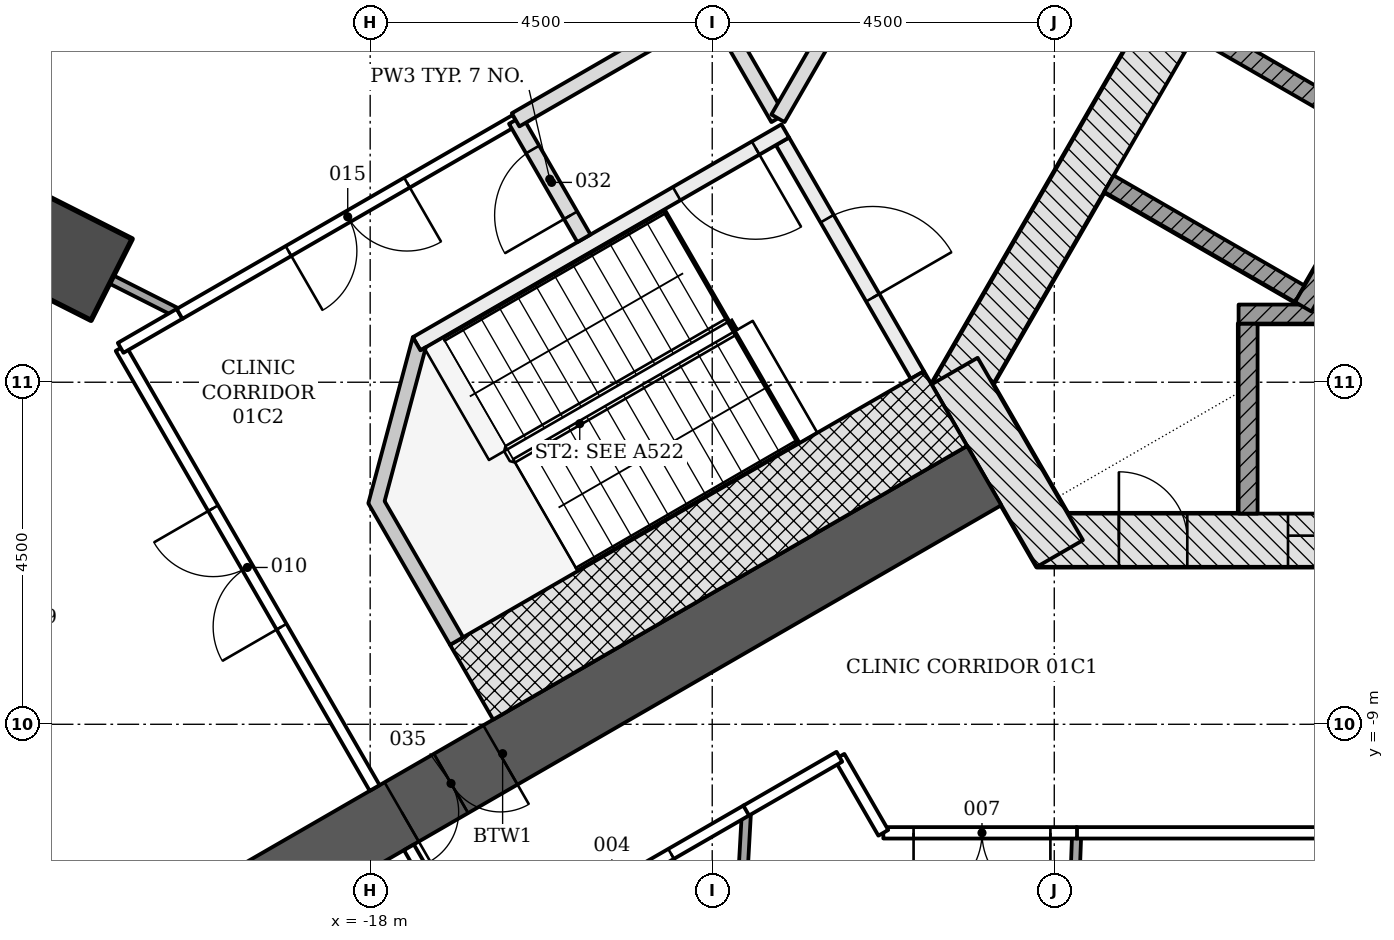
"""IFC4 building model, lengths in metres.
Left out: names, types, materials, properties, quantities, classifications, styles, units other than length and angle.
Written with IfcOpenShell. Run it as: python <this file> out.ifc"""

import sys

from ifc_helpers import new_model, si_unit, direction, frame, frame_2d, origin, origin_2d, place, context, subcontext, project, spatial, polyline, rectangle, outline, extrude, element, fill, save


model = new_model("IFC4")
c1 = context("Model", 3, precision=1e-05, world=origin(), true_north=direction((0.0, 1.0)))
c2 = subcontext(c1, "Body", "Model", "MODEL_VIEW")
j1 = project(units=[si_unit("LENGTHUNIT", "METRE"), si_unit("PLANEANGLEUNIT", "RADIAN")], contexts=[c1])
p1 = place(None, origin())
s1 = spatial("IfcSite", under=j1, at=p1, CompositionType="ELEMENT")
p2 = place(p1, origin())
s2 = spatial("IfcBuilding", under=s1, at=p2, CompositionType="ELEMENT")
p3 = place(p2, frame((0.0, 0.0, 6.0)))
s3 = spatial("IfcBuildingStorey", under=s2, at=p3, CompositionType="ELEMENT", Elevation=6.0)
p4 = place(p3, frame((-21.937, -2.88, -0.25), z_axis=(0.0, 0.0, 1.0), x_axis=(-0.89250065469, 0.451046096733, 0.0)))
e1 = element("IfcColumn", 1, at=p4, inside=s3, PredefinedType="COLUMN", context=c2, shape_type="SweptSolid", body=[
    extrude(rectangle(XDim=1.2, YDim=1.2, at=origin_2d()), origin(), (0.0, 0.0, 1.0), 4.5),
])
p5 = place(p3, frame((-9.229, -6.578, -0.25), z_axis=(0.0, 0.0, 1.0), x_axis=(1.0, 0.0, 0.0)))
e2 = element("IfcWall", 2, at=p5, inside=s3, PredefinedType="SHEAR", context=c2, shape_type="SweptSolid", body=[
    extrude(rectangle(XDim=18.458, YDim=0.7, at=frame_2d((9.229, 0.0))), origin(), (0.0, 0.0, 1.0), 4.5),
])
p6 = place(p5, frame((3.304, 0.0, 0.25)))
e3 = element("IfcOpeningElement", 3, at=p6, cuts=e2, PredefinedType="OPENING", context=c2, shape_type="SweptSolid", body=[
    extrude(rectangle(XDim=1.1, YDim=2.1, at=frame_2d((0.55, 1.05))), frame((0.0, 0.36, 0.0), z_axis=(0.0, -1.0, 0.0), x_axis=(1.0, 0.0, 0.0)), (0.0, 0.0, 1.0), 0.72),
])
p7 = place(p5, frame((5.454, 0.0, 0.25)))
e4 = element("IfcOpeningElement", 4, at=p7, cuts=e2, PredefinedType="OPENING", context=c2, shape_type="SweptSolid", body=[
    extrude(rectangle(XDim=1.1, YDim=2.1, at=frame_2d((0.55, 1.05))), frame((0.0, 0.36, 0.0), z_axis=(0.0, -1.0, 0.0), x_axis=(1.0, 0.0, 0.0)), (0.0, 0.0, 1.0), 0.72),
])
p8 = place(p5, frame((7.604, 0.0, 0.25)))
e5 = element("IfcOpeningElement", 5, at=p8, cuts=e2, PredefinedType="OPENING", context=c2, shape_type="SweptSolid", body=[
    extrude(rectangle(XDim=1.1, YDim=2.1, at=frame_2d((0.55, 1.05))), frame((0.0, 0.36, 0.0), z_axis=(0.0, -1.0, 0.0), x_axis=(1.0, 0.0, 0.0)), (0.0, 0.0, 1.0), 0.72),
])
p9 = place(p5, frame((9.754, 0.0, 0.25)))
e6 = element("IfcOpeningElement", 6, at=p9, cuts=e2, PredefinedType="OPENING", context=c2, shape_type="SweptSolid", body=[
    extrude(rectangle(XDim=1.1, YDim=2.1, at=frame_2d((0.55, 1.05))), frame((0.0, 0.36, 0.0), z_axis=(0.0, -1.0, 0.0), x_axis=(1.0, 0.0, 0.0)), (0.0, 0.0, 1.0), 0.72),
])
p10 = place(p5, frame((11.904, 0.0, 0.25)))
e7 = element("IfcOpeningElement", 7, at=p10, cuts=e2, PredefinedType="OPENING", context=c2, shape_type="SweptSolid", body=[
    extrude(rectangle(XDim=1.1, YDim=2.1, at=frame_2d((0.55, 1.05))), frame((0.0, 0.36, 0.0), z_axis=(0.0, -1.0, 0.0), x_axis=(1.0, 0.0, 0.0)), (0.0, 0.0, 1.0), 0.72),
])
p11 = place(p5, frame((14.054, 0.0, 0.25)))
e8 = element("IfcOpeningElement", 8, at=p11, cuts=e2, PredefinedType="OPENING", context=c2, shape_type="SweptSolid", body=[
    extrude(rectangle(XDim=1.1, YDim=2.1, at=frame_2d((0.55, 1.05))), frame((0.0, 0.36, 0.0), z_axis=(0.0, -1.0, 0.0), x_axis=(1.0, 0.0, 0.0)), (0.0, 0.0, 1.0), 0.72),
])
p12 = place(p5, frame((1.079, 0.0, 0.25)))
e9 = element("IfcOpeningElement", 9, at=p12, cuts=e2, PredefinedType="OPENING", context=c2, shape_type="SweptSolid", body=[
    extrude(rectangle(XDim=0.9, YDim=2.1, at=frame_2d((0.45, 1.05))), frame((0.0, 0.36, 0.0), z_axis=(0.0, -1.0, 0.0), x_axis=(1.0, 0.0, 0.0)), (0.0, 0.0, 1.0), 0.72),
])
p13 = place(p3, frame((-1.083, 11.281, -0.25), z_axis=(0.0, 0.0, 1.0), x_axis=(-0.500001446645, -0.866024568562, 0.0)))
e10 = element("IfcWall", 10, at=p13, inside=s3, PredefinedType="SHEAR", context=c2, shape_type="SweptSolid", body=[
    extrude(rectangle(XDim=18.458, YDim=0.7, at=frame_2d((9.229, 0.0))), origin(), (0.0, 0.0, 1.0), 4.5),
])
p14 = place(p13, frame((8.979, 0.0, 0.25)))
e11 = element("IfcOpeningElement", 11, at=p14, cuts=e10, PredefinedType="OPENING", context=c2, shape_type="SweptSolid", body=[
    extrude(rectangle(XDim=1.2, YDim=2.1, at=frame_2d((0.6, 1.05))), frame((0.0, 0.36, 0.0), z_axis=(0.0, -1.0, 0.0), x_axis=(1.0, 0.0, 0.0)), (0.0, 0.0, 1.0), 0.72),
])
p15 = place(p13, frame((11.029, 0.0, 0.25)))
e12 = element("IfcOpeningElement", 12, at=p15, cuts=e10, PredefinedType="OPENING", context=c2, shape_type="SweptSolid", body=[
    extrude(rectangle(XDim=1.2, YDim=2.1, at=frame_2d((0.6, 1.05))), frame((0.0, 0.36, 0.0), z_axis=(0.0, -1.0, 0.0), x_axis=(1.0, 0.0, 0.0)), (0.0, 0.0, 1.0), 0.72),
])
p16 = place(p3, frame((-10.311, -4.353, -0.25), z_axis=(0.0, 0.0, 1.0), x_axis=(0.500042739161, -0.866000726912, 0.0)))
e13 = element("IfcWall", 13, at=p16, inside=s3, PredefinedType="SHEAR", context=c2, shape_type="SweptSolid", body=[
    extrude(rectangle(XDim=2.771, YDim=0.7, at=frame_2d((1.386, 0.0))), origin(), (0.0, 0.0, 1.0), 4.5),
])
p17 = place(p3, frame((-9.922, -5.728, -0.25), z_axis=(0.0, 0.0, 1.0), x_axis=(-0.866028046028, -0.499995423472, 0.0)))
e14 = element("IfcWall", 14, at=p17, inside=s3, PredefinedType="SHEAR", context=c2, shape_type="SweptSolid", body=[
    extrude(rectangle(XDim=14.633, YDim=0.9, at=frame_2d((7.316, 0.0))), origin(), (0.0, 0.0, 1.0), 4.5),
])
p18 = place(p17, frame((7.35, 0.0, 0.25)))
e15 = element("IfcOpeningElement", 15, at=p18, cuts=e14, PredefinedType="OPENING", context=c2, shape_type="SweptSolid", body=[
    extrude(rectangle(XDim=1.5, YDim=2.1, at=frame_2d((0.75, 1.05))), frame((0.0, 0.46, 0.0), z_axis=(0.0, -1.0, 0.0), x_axis=(1.0, 0.0, 0.0)), (0.0, 0.0, 1.0), 0.92),
])
p19 = place(p3, frame((-6.45, -6.228, -0.25), z_axis=(0.0, 0.0, 1.0), x_axis=(0.0, 1.0, 0.0)))
e16 = element("IfcWall", 16, at=p19, inside=s3, PredefinedType="PARTITIONING", context=c2, shape_type="SweptSolid", body=[
    extrude(rectangle(XDim=2.5, YDim=0.25, at=frame_2d((1.25, 0.0))), origin(), (0.0, 0.0, 1.0), 4.5),
])
p20 = place(p3, frame((-6.575, -3.603, 0.0), z_axis=(0.0, 0.0, 1.0), x_axis=(1.0, 0.0, 0.0)))
e17 = element("IfcWall", 17, at=p20, inside=s3, PredefinedType="PARTITIONING", context=c2, shape_type="SweptSolid", body=[
    extrude(rectangle(XDim=13.15, YDim=0.25, at=frame_2d((6.575, 0.0))), origin(), (0.0, 0.0, 1.0), 4.25),
])
for number, where, z_axis, x_axis in (
    (18, (-7.106, 0.148, -0.25), (0.0, 0.0, 1.0), (0.866, -0.5, 0.0)),
    (19, (-8.281, -1.887, -0.25), (0.0, 0.0, 1.0), (0.866, -0.5, 0.0)),
):
    element("IfcWall", number, at=place(p3, frame(where, z_axis=z_axis, x_axis=x_axis)), inside=s3, PredefinedType="PARTITIONING", context=c2, shape_type="SweptSolid", body=[
        extrude(rectangle(XDim=2.9, YDim=0.25, at=frame_2d((1.45, 0.0))), origin(), (0.0, 0.0, 1.0), 4.5),
    ])
p21 = place(p3, frame((0.176, 6.711, 0.0), z_axis=(0.0, 0.0, 1.0), x_axis=(-0.500004227369, -0.866022963098, 0.0)))
e20 = element("IfcWall", 20, at=p21, inside=s3, PredefinedType="PARTITIONING", context=c2, shape_type="SweptSolid", body=[
    extrude(rectangle(XDim=11.8, YDim=0.25, at=frame_2d((5.9, 0.0))), origin(), (0.0, 0.0, 1.0), 4.25),
])
p22 = place(p3, frame((-12.576, -1.331, -0.25), z_axis=(0.0, 0.0, 1.0), x_axis=(0.499970499736, -0.8660424351, 0.0)))
e21 = element("IfcWall", 21, at=p22, inside=s3, PredefinedType="SHEAR", context=c2, shape_type="SweptSolid", body=[
    extrude(rectangle(XDim=3.55, YDim=0.2, at=frame_2d((1.775, 0.0))), origin(), (0.0, 0.0, 1.0), 4.5),
])
p23 = place(p22, frame((1.175, 0.0, 0.25)))
e22 = element("IfcOpeningElement", 22, at=p23, cuts=e21, PredefinedType="OPENING", context=c2, shape_type="SweptSolid", body=[
    extrude(rectangle(XDim=1.2, YDim=2.1, at=frame_2d((0.6, 1.05))), frame((0.0, 0.11, 0.0), z_axis=(0.0, -1.0, 0.0), x_axis=(1.0, 0.0, 0.0)), (0.0, 0.0, 1.0), 0.22),
])
p24 = place(p3, frame((-12.539, -1.194, -0.25), z_axis=(0.0, 0.0, 1.0), x_axis=(-0.866045472092, -0.499965239061, 0.0)))
e23 = element("IfcWall", 23, at=p24, inside=s3, PredefinedType="SHEAR", context=c2, shape_type="SweptSolid", body=[
    extrude(rectangle(XDim=5.6, YDim=0.2, at=frame_2d((2.8, 0.0))), origin(), (0.0, 0.0, 1.0), 4.5),
])
p25 = place(p24, frame((0.45, 0.0, 0.25)))
e24 = element("IfcOpeningElement", 24, at=p25, cuts=e23, PredefinedType="OPENING", context=c2, shape_type="SweptSolid", body=[
    extrude(rectangle(XDim=1.2, YDim=2.1, at=frame_2d((0.6, 1.05))), frame((0.0, 0.11, 0.0), z_axis=(0.0, -1.0, 0.0), x_axis=(1.0, 0.0, 0.0)), (0.0, 0.0, 1.0), 0.22),
])
p26 = place(p3, frame((-10.43, -4.847, -0.25), z_axis=(0.0, 0.0, 1.0), x_axis=(-0.866018442252, -0.500012057535, 0.0)))
e25 = element("IfcWall", 25, at=p26, inside=s3, PredefinedType="SHEAR", context=c2, shape_type="SweptSolid", body=[
    extrude(rectangle(XDim=7.2, YDim=1.136, at=frame_2d((3.6, 0.0))), origin(), (0.0, 0.0, 1.0), 4.5),
])
p27 = place(p3, frame((0.0, 0.0, -0.25)))
e26 = element("IfcWall", 26, at=p27, inside=s3, PredefinedType="SHEAR", context=c2, shape_type="SweptSolid", body=[
    extrude(outline(polyline([(-17.439, -3.907), (-18.025, -6.093), (-16.95, -7.955), (-16.777, -7.855), (-17.81, -6.065), (-17.267, -4.039), (-17.339, -4.081), (-17.339, -4.081), (-17.339, -4.081), (-17.339, -4.081), (-17.339, -4.081), (-17.339, -4.081), (-17.339, -4.081), (-17.339, -4.081), (-17.339, -4.081), (-17.339, -4.081), (-17.339, -4.081), (-17.339, -4.081), (-17.339, -4.081), (-17.339, -4.081), (-17.339, -4.081), (-17.339, -4.081), (-17.339, -4.081), (-17.439, -3.907)])), origin(), (0.0, 0.0, 1.0), 4.5),
])
p28 = place(p3, frame((-13.429, -16.96, 0.0), z_axis=(0.0, 0.0, 1.0), x_axis=(0.055551088657, 0.998455846069, 0.0)))
e27 = element("IfcWall", 27, at=p28, inside=s3, PredefinedType="PARTITIONING", context=c2, shape_type="SweptSolid", body=[
    extrude(rectangle(XDim=6.838, YDim=0.12, at=frame_2d((3.419, 0.0))), origin(), (0.0, 0.0, 1.0), 3.638),
])
p29 = place(p3, frame((-13.045, -10.13, 0.0), z_axis=(0.0, 0.0, 1.0), x_axis=(-0.866035577775, -0.499982377718, 0.0)))
e28 = element("IfcWall", 28, at=p29, inside=s3, PredefinedType="PARTITIONING", context=c2, shape_type="SweptSolid", body=[
    extrude(rectangle(XDim=4.093, YDim=0.15, at=frame_2d((2.046, 0.0))), origin(), (0.0, 0.0, 1.0), 3.638),
])
p30 = place(p29, frame((1.15, 0.0, 0.0)))
e29 = element("IfcOpeningElement", 29, at=p30, cuts=e28, PredefinedType="OPENING", context=c2, shape_type="SweptSolid", body=[
    extrude(rectangle(XDim=1.8, YDim=2.1, at=frame_2d((0.9, 1.05))), frame((0.0, 0.085, 0.0), z_axis=(0.0, -1.0, 0.0), x_axis=(1.0, 0.0, 0.0)), (0.0, 0.0, 1.0), 0.17),
])
p31 = place(p3, frame((-16.591, -12.176, 0.0), z_axis=(0.0, 0.0, 1.0), x_axis=(-0.499965372359, 0.866045395139, 0.0)))
e30 = element("IfcWall", 30, at=p31, inside=s3, PredefinedType="PARTITIONING", context=c2, shape_type="SweptSolid", body=[
    extrude(rectangle(XDim=1.798, YDim=0.15, at=frame_2d((0.899, 0.0))), origin(), (0.0, 0.0, 1.0), 3.638),
])
p32 = place(p3, frame((-8.705, -10.429, 0.0), z_axis=(0.0, 0.0, 1.0), x_axis=(-0.037170289837, -0.999308945999, 0.0)))
e31 = element("IfcWall", 31, at=p32, inside=s3, PredefinedType="PARTITIONING", context=c2, shape_type="SweptSolid", body=[
    extrude(rectangle(XDim=7.343, YDim=0.12, at=frame_2d((3.672, 0.0))), origin(), (0.0, 0.0, 1.0), 3.638),
])
p33 = place(p3, frame((0.004, -10.428, 0.0), z_axis=(0.0, 0.0, 1.0), x_axis=(-1.0, 0.0, 0.0)))
e32 = element("IfcWall", 32, at=p33, inside=s3, PredefinedType="PARTITIONING", context=c2, shape_type="SweptSolid", body=[
    extrude(rectangle(XDim=8.713, YDim=0.15, at=frame_2d((4.356, 0.0))), origin(), (0.0, 0.0, 1.0), 3.638),
])
p34 = place(p33, frame((3.45, 0.0, 0.0)))
e33 = element("IfcOpeningElement", 33, at=p34, cuts=e32, PredefinedType="OPENING", context=c2, shape_type="SweptSolid", body=[
    extrude(rectangle(XDim=1.8, YDim=2.1, at=frame_2d((0.9, 1.05))), frame((0.0, 0.085, 0.0), z_axis=(0.0, -1.0, 0.0), x_axis=(1.0, 0.0, 0.0)), (0.0, 0.0, 1.0), 0.17),
])
p35 = place(p3, frame((-8.701, -10.428, 0.0), z_axis=(0.0, 0.0, 1.0), x_axis=(-1.0, 0.0, 0.0)))
e34 = element("IfcWall", 34, at=p35, inside=s3, PredefinedType="PARTITIONING", context=c2, shape_type="SweptSolid", body=[
    extrude(rectangle(XDim=2.548, YDim=0.15, at=frame_2d((1.274, 0.0))), origin(), (0.0, 0.0, 1.0), 3.638),
])
p36 = place(p35, frame((0.35, 0.0, 0.0)))
e35 = element("IfcOpeningElement", 35, at=p36, cuts=e34, PredefinedType="OPENING", context=c2, shape_type="SweptSolid", body=[
    extrude(rectangle(XDim=1.8, YDim=2.1, at=frame_2d((0.9, 1.05))), frame((0.0, 0.085, 0.0), z_axis=(0.0, -1.0, 0.0), x_axis=(1.0, 0.0, 0.0)), (0.0, 0.0, 1.0), 0.17),
])
p37 = place(p3, frame((-11.249, -10.428, 0.0), z_axis=(0.0, 0.0, 1.0), x_axis=(-0.499978438088, 0.866037852202, 0.0)))
e36 = element("IfcWall", 36, at=p37, inside=s3, PredefinedType="PARTITIONING", context=c2, shape_type="SweptSolid", body=[
    extrude(rectangle(XDim=1.156, YDim=0.15, at=frame_2d((0.578, 0.0))), origin(), (0.0, 0.0, 1.0), 4.25),
])
p38 = place(p3, frame((-11.827, -9.427, 0.0), z_axis=(0.0, 0.0, 1.0), x_axis=(-0.865984561414, -0.500070734389, 0.0)))
e37 = element("IfcWall", 37, at=p38, inside=s3, PredefinedType="PARTITIONING", context=c2, shape_type="SweptSolid", body=[
    extrude(rectangle(XDim=1.416, YDim=0.15, at=frame_2d((0.708, 0.0))), origin(), (0.0, 0.0, 1.0), 3.638),
])
p39 = place(p3, frame((-17.941, -9.838, 0.0), z_axis=(0.0, 0.0, 1.0), x_axis=(-0.500048140185, 0.865997608252, 0.0)))
e38 = element("IfcWall", 38, at=p39, inside=s3, PredefinedType="PARTITIONING", context=c2, shape_type="SweptSolid", body=[
    extrude(rectangle(XDim=6.683, YDim=0.15, at=frame_2d((3.342, 0.0))), origin(), (0.0, 0.0, 1.0), 3.638),
])
p40 = place(p39, frame((2.45, 0.0, 0.0)))
e39 = element("IfcOpeningElement", 39, at=p40, cuts=e38, PredefinedType="OPENING", context=c2, shape_type="SweptSolid", body=[
    extrude(rectangle(XDim=1.8, YDim=2.1, at=frame_2d((0.9, 1.05))), frame((0.0, 0.085, 0.0), z_axis=(0.0, -1.0, 0.0), x_axis=(1.0, 0.0, 0.0)), (0.0, 0.0, 1.0), 0.17),
])
p41 = place(p3, frame((-21.283, -4.048, 0.0), z_axis=(0.0, 0.0, 1.0), x_axis=(0.865804825377, 0.500381858538, 0.0)))
e40 = element("IfcWall", 40, at=p41, inside=s3, PredefinedType="PARTITIONING", context=c2, shape_type="SweptSolid", body=[
    extrude(rectangle(XDim=0.897, YDim=0.15, at=frame_2d((0.449, 0.0))), origin(), (0.0, 0.0, 1.0), 3.638),
])
p42 = place(p3, frame((-20.509, -3.601, 0.0), z_axis=(0.0, 0.0, 1.0), x_axis=(-0.892316605155, 0.451410097544, 0.0)))
e41 = element("IfcWall", 41, at=p42, inside=s3, PredefinedType="PARTITIONING", context=c2, shape_type="SweptSolid", body=[
    extrude(rectangle(XDim=1.0, YDim=0.12, at=frame_2d((0.5, 0.0))), origin(), (0.0, 0.0, 1.0), 3.638),
])
p43 = place(p3, frame((-16.087, -1.049, 0.0), z_axis=(0.0, 0.0, 1.0), x_axis=(-0.866071706002, -0.49991979363, 0.0)))
e42 = element("IfcWall", 42, at=p43, inside=s3, PredefinedType="PARTITIONING", context=c2, shape_type="SweptSolid", body=[
    extrude(rectangle(XDim=5.105, YDim=0.15, at=frame_2d((2.552, 0.0))), origin(), (0.0, 0.0, 1.0), 3.638),
])
p44 = place(p43, frame((1.65, 0.0, 0.0)))
e43 = element("IfcOpeningElement", 43, at=p44, cuts=e42, PredefinedType="OPENING", context=c2, shape_type="SweptSolid", body=[
    extrude(rectangle(XDim=1.8, YDim=2.1, at=frame_2d((0.9, 1.05))), frame((0.0, 0.085, 0.0), z_axis=(0.0, -1.0, 0.0), x_axis=(1.0, 0.0, 0.0)), (0.0, 0.0, 1.0), 0.17),
])
p45 = place(p3, frame((-15.188, -2.607, 0.0), z_axis=(0.0, 0.0, 1.0), x_axis=(-0.500024172624, 0.866011447264, 0.0)))
e44 = element("IfcWall", 44, at=p45, inside=s3, PredefinedType="PARTITIONING", context=c2, shape_type="SweptSolid", body=[
    extrude(rectangle(XDim=1.798, YDim=0.2, at=frame_2d((0.899, 0.0))), origin(), (0.0, 0.0, 1.0), 3.638),
])
p46 = place(p45, frame((0.35, 0.0, 0.0)))
e45 = element("IfcOpeningElement", 45, at=p46, cuts=e44, PredefinedType="OPENING", context=c2, shape_type="SweptSolid", body=[
    extrude(rectangle(XDim=1.0, YDim=2.1, at=frame_2d((0.5, 1.05))), frame((0.0, 0.11, 0.0), z_axis=(0.0, -1.0, 0.0), x_axis=(1.0, 0.0, 0.0)), (0.0, 0.0, 1.0), 0.22),
])
p47 = place(p3, frame((-16.087, -1.048, 0.0), z_axis=(0.0, 0.0, 1.0), x_axis=(0.865988915629, 0.500063194015, 0.0)))
e46 = element("IfcWall", 46, at=p47, inside=s3, PredefinedType="PARTITIONING", context=c2, shape_type="SweptSolid", body=[
    extrude(rectangle(XDim=2.998, YDim=0.2, at=frame_2d((1.499, 0.0))), origin(), (0.0, 0.0, 1.0), 3.638),
])
p48 = place(p3, frame((-13.489, 0.451, 0.0), z_axis=(0.0, 0.0, 1.0), x_axis=(0.500044178772, -0.865999895656, 0.0)))
e47 = element("IfcWall", 47, at=p48, inside=s3, PredefinedType="PARTITIONING", context=c2, shape_type="SweptSolid", body=[
    extrude(rectangle(XDim=1.708, YDim=0.2, at=frame_2d((0.854, 0.0))), origin(), (0.0, 0.0, 1.0), 4.25),
])
p49 = place(p3, frame((-12.635, -1.028, 0.0), z_axis=(0.0, 0.0, 1.0), x_axis=(0.50005725472, 0.865992345233, 0.0)))
e48 = element("IfcWall", 48, at=p49, inside=s3, PredefinedType="PARTITIONING", context=c2, shape_type="SweptSolid", body=[
    extrude(rectangle(XDim=2.862, YDim=0.2, at=frame_2d((1.431, 0.0))), origin(), (0.0, 0.0, 1.0), 3.638),
])
p50 = place(p6, origin())
e49 = element("IfcDoor", 49, at=p50, inside=s3, OperationType="DOUBLE_DOOR_SLIDING", PredefinedType="DOOR", context=c2, shape_type="SweptSolid", body=[
    extrude(rectangle(XDim=1.1, YDim=2.1, at=frame_2d((0.55, 1.05))), frame((0.0, 0.025, 0.0), z_axis=(0.0, -1.0, 0.0), x_axis=(1.0, 0.0, 0.0)), (0.0, 0.0, 1.0), 0.05),
])
fill(e3, e49)
p51 = place(p12, origin())
e50 = element("IfcDoor", 50, at=p51, inside=s3, OperationType="SINGLE_SWING_LEFT", PredefinedType="DOOR", context=c2, shape_type="SweptSolid", body=[
    extrude(rectangle(XDim=0.9, YDim=2.1, at=frame_2d((0.45, 1.05))), frame((0.0, 0.075, 0.0), z_axis=(0.0, -1.0, 0.0), x_axis=(1.0, 0.0, 0.0)), (0.0, 0.0, 1.0), 0.15),
])
fill(e9, e50)
p52 = place(p23, origin())
e51 = element("IfcDoor", 51, at=p52, inside=s3, OperationType="SINGLE_SWING_RIGHT", PredefinedType="DOOR", context=c2, shape_type="SweptSolid", body=[
    extrude(rectangle(XDim=1.2, YDim=2.1, at=frame_2d((0.6, 1.05))), frame((0.0, 0.025, 0.0), z_axis=(0.0, -1.0, 0.0), x_axis=(1.0, 0.0, 0.0)), (0.0, 0.0, 1.0), 0.05),
])
fill(e22, e51)
p53 = place(p25, origin())
e52 = element("IfcDoor", 52, at=p53, inside=s3, OperationType="SINGLE_SWING_LEFT", PredefinedType="DOOR", context=c2, shape_type="SweptSolid", body=[
    extrude(rectangle(XDim=1.2, YDim=2.1, at=frame_2d((0.6, 1.05))), frame((0.0, 0.025, 0.0), z_axis=(0.0, -1.0, 0.0), x_axis=(1.0, 0.0, 0.0)), (0.0, 0.0, 1.0), 0.05),
])
fill(e24, e52)
p54 = place(p30, origin())
e53 = element("IfcDoor", 53, at=p54, inside=s3, OperationType="DOUBLE_DOOR_SINGLE_SWING", PredefinedType="DOOR", context=c2, shape_type="SweptSolid", body=[
    extrude(rectangle(XDim=1.8, YDim=2.1, at=frame_2d((0.9, 1.05))), frame((0.0, 0.025, 0.0), z_axis=(0.0, -1.0, 0.0), x_axis=(1.0, 0.0, 0.0)), (0.0, 0.0, 1.0), 0.05),
])
fill(e29, e53)
p55 = place(p36, origin())
e54 = element("IfcDoor", 54, at=p55, inside=s3, OperationType="DOUBLE_DOOR_SINGLE_SWING", PredefinedType="DOOR", context=c2, shape_type="SweptSolid", body=[
    extrude(rectangle(XDim=1.8, YDim=2.1, at=frame_2d((0.9, 1.05))), frame((0.0, 0.025, 0.0), z_axis=(0.0, -1.0, 0.0), x_axis=(1.0, 0.0, 0.0)), (0.0, 0.0, 1.0), 0.05),
])
fill(e35, e54)
p56 = place(p40, origin())
e55 = element("IfcDoor", 55, at=p56, inside=s3, OperationType="DOUBLE_DOOR_SINGLE_SWING", PredefinedType="DOOR", context=c2, shape_type="SweptSolid", body=[
    extrude(rectangle(XDim=1.8, YDim=2.1, at=frame_2d((0.9, 1.05))), frame((0.0, 0.025, 0.0), z_axis=(0.0, -1.0, 0.0), x_axis=(1.0, 0.0, 0.0)), (0.0, 0.0, 1.0), 0.05),
])
fill(e39, e55)
p57 = place(p44, origin())
e56 = element("IfcDoor", 56, at=p57, inside=s3, OperationType="DOUBLE_DOOR_SINGLE_SWING", PredefinedType="DOOR", context=c2, shape_type="SweptSolid", body=[
    extrude(rectangle(XDim=1.8, YDim=2.1, at=frame_2d((0.9, 1.05))), frame((0.0, 0.025, 0.0), z_axis=(0.0, -1.0, 0.0), x_axis=(1.0, 0.0, 0.0)), (0.0, 0.0, 1.0), 0.05),
])
fill(e43, e56)
p58 = place(p46, origin())
e57 = element("IfcDoor", 57, at=p58, inside=s3, OperationType="SINGLE_SWING_LEFT", PredefinedType="DOOR", context=c2, shape_type="SweptSolid", body=[
    extrude(rectangle(XDim=1.0, YDim=2.1, at=frame_2d((0.5, 1.05))), frame((0.0, 0.025, 0.0), z_axis=(0.0, -1.0, 0.0), x_axis=(1.0, 0.0, 0.0)), (0.0, 0.0, 1.0), 0.05),
])
fill(e45, e57)
p59 = place(p18, origin())
e58 = element("IfcDoor", 58, at=p59, inside=s3, OperationType="DOUBLE_DOOR_SINGLE_SWING", PredefinedType="DOOR", context=c2, shape_type="SweptSolid", body=[
    extrude(rectangle(XDim=1.5, YDim=2.1, at=frame_2d((0.75, 1.05))), frame((0.0, 0.025, 0.0), z_axis=(0.0, -1.0, 0.0), x_axis=(1.0, 0.0, 0.0)), (0.0, 0.0, 1.0), 0.05),
])
fill(e15, e58)
save(model, sys.argv[1])
